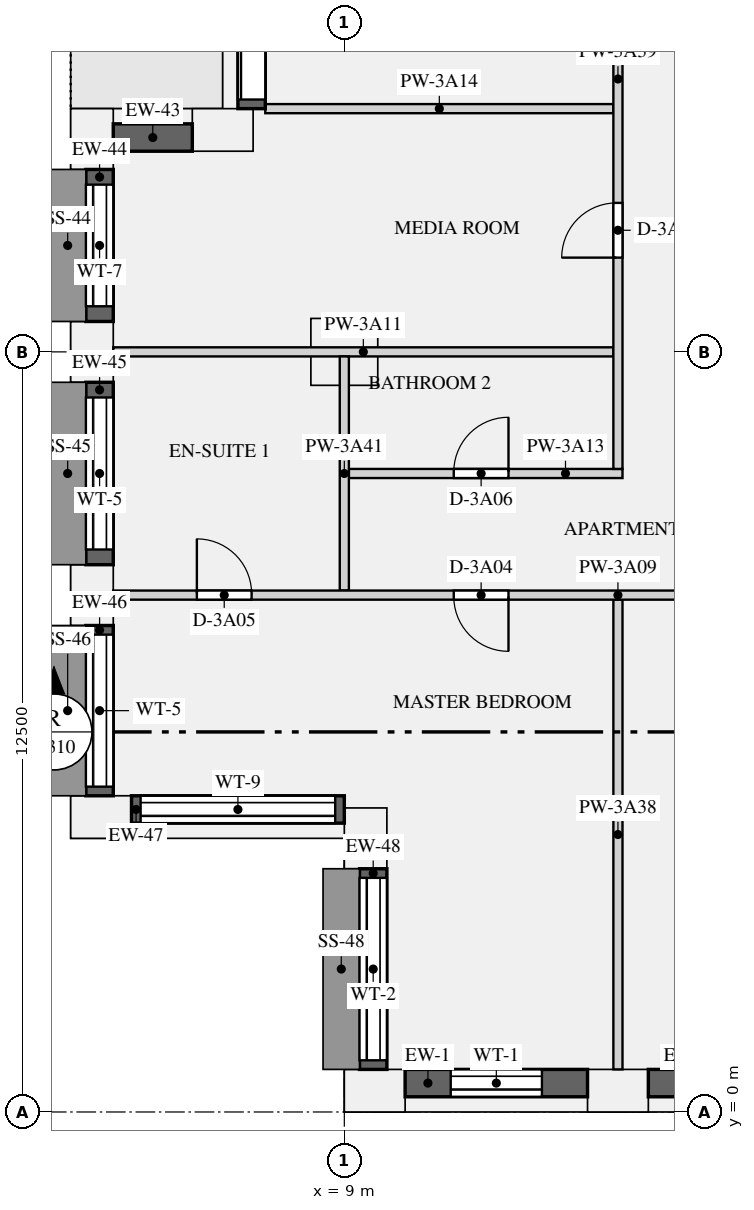
"""IFC4 building model, lengths in metres.
Left out: names, types, materials, properties, quantities, classifications, styles, units other than length and angle.
Written with IfcOpenShell. Run it as: python <this file> out.ifc"""

import sys

from ifc_helpers import new_model, si_unit, direction, frame, frame_2d, origin, origin_2d, place, context, subcontext, project, spatial, rectangle, extrude, element, fill, save


model = new_model("IFC4")
c1 = context("Model", 3, precision=1e-05, world=origin(), true_north=direction((0.0, 1.0)))
c2 = subcontext(c1, "Body", "Model", "MODEL_VIEW")
j1 = project(units=[si_unit("LENGTHUNIT", "METRE"), si_unit("PLANEANGLEUNIT", "RADIAN")], contexts=[c1])
p1 = place(None, origin())
s1 = spatial("IfcSite", under=j1, at=p1, CompositionType="ELEMENT")
p2 = place(p1, origin())
s2 = spatial("IfcBuilding", under=s1, at=p2, CompositionType="ELEMENT")
p3 = place(p2, frame((0.0, 0.0, 141.3)))
s3 = spatial("IfcBuildingStorey", under=s2, at=p3, CompositionType="ELEMENT", Elevation=141.3)
for number, where, z_axis, x_axis in (
    (1, (9.5, 0.35, 0.0), (0.0, 0.0, 1.0), (1.0, 0.0, 0.0)),
    (2, (13.5, 0.35, 0.0), (0.0, 0.0, 1.0), (1.0, 0.0, 0.0)),
    (3, (7.0, 16.15, 0.0), (0.0, 0.0, 1.0), (-1.0, 0.0, 0.0)),
    (4, (4.85, 16.0, 0.0), (0.0, 0.0, 1.0), (0.0, -1.0, 0.0)),
    (5, (4.85, 12.5, 0.0), (0.0, 0.0, 1.0), (0.0, -1.0, 0.0)),
    (6, (4.85, 8.5, 0.0), (0.0, 0.0, 1.0), (0.0, -1.0, 0.0)),
    (7, (5.0, 4.85, 0.0), (0.0, 0.0, 1.0), (1.0, 0.0, 0.0)),
    (8, (9.35, 4.5, 0.0), (0.0, 0.0, 1.0), (0.0, -1.0, 0.0)),
):
    element("IfcColumn", number, at=place(p3, frame(where, z_axis=z_axis, x_axis=x_axis)), inside=s3, PredefinedType="USERDEFINED", context=c2, shape_type="SweptSolid", body=[
        extrude(rectangle(XDim=1.0, YDim=0.7, at=origin_2d()), origin(), (0.0, 0.0, 1.0), 3.15),
    ])
p4 = place(p3, frame((9.0, 12.5, 0.0), z_axis=(0.0, 0.0, 1.0), x_axis=(1.0, 0.0, 0.0)))
e9 = element("IfcColumn", 9, at=p4, inside=s3, PredefinedType="COLUMN", context=c2, shape_type="SweptSolid", body=[
    extrude(rectangle(XDim=1.1, YDim=1.1, at=origin_2d()), origin(), (0.0, 0.0, 1.0), 3.15),
])
p5 = place(p3, frame((10.0, 0.475, 0.9), z_axis=(0.0, 0.0, 1.0), x_axis=(1.0, 0.0, 0.0)))
e10 = element("IfcWall", 10, at=p5, inside=s3, PredefinedType="SOLIDWALL", context=c2, shape_type="SweptSolid", body=[
    extrude(rectangle(XDim=3.0, YDim=0.45, at=frame_2d((1.5, 0.0))), origin(), (0.0, 0.0, 1.0), 1.93),
])
p6 = place(p5, frame((0.75, 0.0, 0.15)))
e11 = element("IfcOpeningElement", 11, at=p6, cuts=e10, PredefinedType="OPENING", context=c2, shape_type="SweptSolid", body=[
    extrude(rectangle(XDim=1.5, YDim=1.5, at=frame_2d((0.75, 0.75))), frame((0.0, 0.235, 0.0), z_axis=(0.0, -1.0, 0.0), x_axis=(1.0, 0.0, 0.0)), (0.0, 0.0, 1.0), 0.47),
])
p7 = place(p3, frame((14.0, 0.475, 0.9), z_axis=(0.0, 0.0, 1.0), x_axis=(1.0, 0.0, 0.0)))
e12 = element("IfcWall", 12, at=p7, inside=s3, PredefinedType="SOLIDWALL", context=c2, shape_type="SweptSolid", body=[
    extrude(rectangle(XDim=4.0, YDim=0.45, at=frame_2d((2.0, 0.0))), origin(), (0.0, 0.0, 1.0), 1.93),
])
p8 = place(p7, frame((1.25, 0.0, 0.15)))
e13 = element("IfcOpeningElement", 13, at=p8, cuts=e12, PredefinedType="OPENING", context=c2, shape_type="SweptSolid", body=[
    extrude(rectangle(XDim=1.5, YDim=1.5, at=frame_2d((0.75, 0.75))), frame((0.0, 0.235, 0.0), z_axis=(0.0, -1.0, 0.0), x_axis=(1.0, 0.0, 0.0)), (0.0, 0.0, 1.0), 0.47),
])
p9 = place(p3, frame((7.475, 20.0, 0.0), z_axis=(0.0, 0.0, 1.0), x_axis=(0.0, -1.0, 0.0)))
e14 = element("IfcWall", 14, at=p9, inside=s3, PredefinedType="SOLIDWALL", context=c2, shape_type="SweptSolid", body=[
    extrude(rectangle(XDim=3.5, YDim=0.45, at=frame_2d((1.75, 0.0))), origin(), (0.0, 0.0, 1.0), 2.83),
])
p10 = place(p9, frame((0.15, 0.0, 0.0)))
e15 = element("IfcOpeningElement", 15, at=p10, cuts=e14, PredefinedType="OPENING", context=c2, shape_type="SweptSolid", body=[
    extrude(rectangle(XDim=3.2, YDim=2.3, at=frame_2d((1.6, 1.15))), frame((0.0, 0.235, 0.0), z_axis=(0.0, -1.0, 0.0), x_axis=(1.0, 0.0, 0.0)), (0.0, 0.0, 1.0), 0.47),
])
p11 = place(p3, frame((6.5, 16.025, 0.9), z_axis=(0.0, 0.0, 1.0), x_axis=(-1.0, 0.0, 0.0)))
e16 = element("IfcWall", 16, at=p11, inside=s3, PredefinedType="SOLIDWALL", context=c2, shape_type="SweptSolid", body=[
    extrude(rectangle(XDim=1.3, YDim=0.45, at=frame_2d((0.65, 0.0))), origin(), (0.0, 0.0, 1.0), 1.93),
])
p12 = place(p3, frame((4.975, 15.5, 0.9), z_axis=(0.0, 0.0, 1.0), x_axis=(0.0, -1.0, 0.0)))
e17 = element("IfcWall", 17, at=p12, inside=s3, PredefinedType="SOLIDWALL", context=c2, shape_type="SweptSolid", body=[
    extrude(rectangle(XDim=2.5, YDim=0.45, at=frame_2d((1.25, 0.0))), origin(), (0.0, 0.0, 1.0), 1.93),
])
p13 = place(p12, frame((0.25, 0.0, 0.15)))
e18 = element("IfcOpeningElement", 18, at=p13, cuts=e17, PredefinedType="OPENING", context=c2, shape_type="SweptSolid", body=[
    extrude(rectangle(XDim=2.0, YDim=1.5, at=frame_2d((1.0, 0.75))), frame((0.0, 0.235, 0.0), z_axis=(0.0, -1.0, 0.0), x_axis=(1.0, 0.0, 0.0)), (0.0, 0.0, 1.0), 0.47),
])
p14 = place(p3, frame((4.975, 12.0, 0.9), z_axis=(0.0, 0.0, 1.0), x_axis=(0.0, -1.0, 0.0)))
e19 = element("IfcWall", 19, at=p14, inside=s3, PredefinedType="SOLIDWALL", context=c2, shape_type="SweptSolid", body=[
    extrude(rectangle(XDim=3.0, YDim=0.45, at=frame_2d((1.5, 0.0))), origin(), (0.0, 0.0, 1.0), 1.93),
])
p15 = place(p14, frame((0.25, 0.0, 0.15)))
e20 = element("IfcOpeningElement", 20, at=p15, cuts=e19, PredefinedType="OPENING", context=c2, shape_type="SweptSolid", body=[
    extrude(rectangle(XDim=2.5, YDim=1.5, at=frame_2d((1.25, 0.75))), frame((0.0, 0.235, 0.0), z_axis=(0.0, -1.0, 0.0), x_axis=(1.0, 0.0, 0.0)), (0.0, 0.0, 1.0), 0.47),
])
p16 = place(p3, frame((4.975, 8.0, 0.9), z_axis=(0.0, 0.0, 1.0), x_axis=(0.0, -1.0, 0.0)))
e21 = element("IfcWall", 21, at=p16, inside=s3, PredefinedType="SOLIDWALL", context=c2, shape_type="SweptSolid", body=[
    extrude(rectangle(XDim=2.8, YDim=0.45, at=frame_2d((1.4, 0.0))), origin(), (0.0, 0.0, 1.0), 1.93),
])
p17 = place(p16, frame((0.15, 0.0, 0.15)))
e22 = element("IfcOpeningElement", 22, at=p17, cuts=e21, PredefinedType="OPENING", context=c2, shape_type="SweptSolid", body=[
    extrude(rectangle(XDim=2.5, YDim=1.5, at=frame_2d((1.25, 0.75))), frame((0.0, 0.235, 0.0), z_axis=(0.0, -1.0, 0.0), x_axis=(1.0, 0.0, 0.0)), (0.0, 0.0, 1.0), 0.47),
])
p18 = place(p3, frame((5.5, 4.975, 0.9), z_axis=(0.0, 0.0, 1.0), x_axis=(1.0, 0.0, 0.0)))
e23 = element("IfcWall", 23, at=p18, inside=s3, PredefinedType="SOLIDWALL", context=c2, shape_type="SweptSolid", body=[
    extrude(rectangle(XDim=3.5, YDim=0.45, at=frame_2d((1.75, 0.0))), origin(), (0.0, 0.0, 1.0), 1.93),
])
p19 = place(p18, frame((0.15, 0.0, 0.15)))
e24 = element("IfcOpeningElement", 24, at=p19, cuts=e23, PredefinedType="OPENING", context=c2, shape_type="SweptSolid", body=[
    extrude(rectangle(XDim=3.2, YDim=1.5, at=frame_2d((1.6, 0.75))), frame((0.0, 0.235, 0.0), z_axis=(0.0, -1.0, 0.0), x_axis=(1.0, 0.0, 0.0)), (0.0, 0.0, 1.0), 0.47),
])
p20 = place(p3, frame((9.475, 4.0, 0.9), z_axis=(0.0, 0.0, 1.0), x_axis=(0.0, -1.0, 0.0)))
e25 = element("IfcWall", 25, at=p20, inside=s3, PredefinedType="SOLIDWALL", context=c2, shape_type="SweptSolid", body=[
    extrude(rectangle(XDim=3.3, YDim=0.45, at=frame_2d((1.65, 0.0))), origin(), (0.0, 0.0, 1.0), 1.93),
])
p21 = place(p20, frame((0.15, 0.0, 0.15)))
e26 = element("IfcOpeningElement", 26, at=p21, cuts=e25, PredefinedType="OPENING", context=c2, shape_type="SweptSolid", body=[
    extrude(rectangle(XDim=3.0, YDim=1.5, at=frame_2d((1.5, 0.75))), frame((0.0, 0.235, 0.0), z_axis=(0.0, -1.0, 0.0), x_axis=(1.0, 0.0, 0.0)), (0.0, 0.0, 1.0), 0.47),
])
p22 = place(p3, frame((5.2, 8.5, 0.0), z_axis=(0.0, 0.0, 1.0), x_axis=(1.0, 0.0, 0.0)))
e27 = element("IfcWall", 27, at=p22, inside=s3, PredefinedType="PARTITIONING", context=c2, shape_type="SweptSolid", body=[
    extrude(rectangle(XDim=12.8, YDim=0.15, at=frame_2d((6.4, 0.0))), origin(), (0.0, 0.0, 1.0), 2.83),
])
p23 = place(p22, frame((10.1, 0.0, 0.0)))
e28 = element("IfcOpeningElement", 28, at=p23, cuts=e27, PredefinedType="OPENING", context=c2, shape_type="SweptSolid", body=[
    extrude(rectangle(XDim=0.9, YDim=2.1, at=frame_2d((0.45, 1.05))), frame((0.0, 0.085, 0.0), z_axis=(0.0, -1.0, 0.0), x_axis=(1.0, 0.0, 0.0)), (0.0, 0.0, 1.0), 0.17),
])
p24 = place(p22, frame((5.6, 0.0, 0.0)))
e29 = element("IfcOpeningElement", 29, at=p24, cuts=e27, PredefinedType="OPENING", context=c2, shape_type="SweptSolid", body=[
    extrude(rectangle(XDim=0.9, YDim=2.1, at=frame_2d((0.45, 1.05))), frame((0.0, 0.085, 0.0), z_axis=(0.0, -1.0, 0.0), x_axis=(1.0, 0.0, 0.0)), (0.0, 0.0, 1.0), 0.17),
])
p25 = place(p22, frame((1.375, 0.0, 0.0)))
e30 = element("IfcOpeningElement", 30, at=p25, cuts=e27, PredefinedType="OPENING", context=c2, shape_type="SweptSolid", body=[
    extrude(rectangle(XDim=0.9, YDim=2.1, at=frame_2d((0.45, 1.05))), frame((0.0, 0.085, 0.0), z_axis=(0.0, -1.0, 0.0), x_axis=(1.0, 0.0, 0.0)), (0.0, 0.0, 1.0), 0.17),
])
p26 = place(p3, frame((5.2, 12.5, 0.0), z_axis=(0.0, 0.0, 1.0), x_axis=(1.0, 0.0, 0.0)))
e31 = element("IfcWall", 31, at=p26, inside=s3, PredefinedType="PARTITIONING", context=c2, shape_type="SweptSolid", body=[
    extrude(rectangle(XDim=8.225, YDim=0.15, at=frame_2d((4.113, 0.0))), origin(), (0.0, 0.0, 1.0), 2.83),
])
p27 = place(p3, frame((9.075, 10.5, 0.0), z_axis=(0.0, 0.0, 1.0), x_axis=(1.0, 0.0, 0.0)))
e32 = element("IfcWall", 32, at=p27, inside=s3, PredefinedType="PARTITIONING", context=c2, shape_type="SweptSolid", body=[
    extrude(rectangle(XDim=4.5, YDim=0.15, at=frame_2d((2.25, 0.0))), origin(), (0.0, 0.0, 1.0), 2.83),
])
p28 = place(p27, frame((1.725, 0.0, 0.0)))
e33 = element("IfcOpeningElement", 33, at=p28, cuts=e32, PredefinedType="OPENING", context=c2, shape_type="SweptSolid", body=[
    extrude(rectangle(XDim=0.9, YDim=2.1, at=frame_2d((0.45, 1.05))), frame((0.0, 0.085, 0.0), z_axis=(0.0, -1.0, 0.0), x_axis=(1.0, 0.0, 0.0)), (0.0, 0.0, 1.0), 0.17),
])
p29 = place(p3, frame((7.7, 16.5, 0.0), z_axis=(0.0, 0.0, 1.0), x_axis=(1.0, 0.0, 0.0)))
e34 = element("IfcWall", 34, at=p29, inside=s3, PredefinedType="PARTITIONING", context=c2, shape_type="SweptSolid", body=[
    extrude(rectangle(XDim=5.725, YDim=0.15, at=frame_2d((2.863, 0.0))), origin(), (0.0, 0.0, 1.0), 2.83),
])
p30 = place(p3, frame((13.5, 0.7, 0.0), z_axis=(0.0, 0.0, 1.0), x_axis=(0.0, 1.0, 0.0)))
e35 = element("IfcWall", 35, at=p30, inside=s3, PredefinedType="PARTITIONING", context=c2, shape_type="SweptSolid", body=[
    extrude(rectangle(XDim=7.725, YDim=0.15, at=frame_2d((3.863, 0.0))), origin(), (0.0, 0.0, 1.0), 2.83),
])
p31 = place(p3, frame((13.5, 10.575, 0.0), z_axis=(0.0, 0.0, 1.0), x_axis=(0.0, 1.0, 0.0)))
e36 = element("IfcWall", 36, at=p31, inside=s3, PredefinedType="PARTITIONING", context=c2, shape_type="SweptSolid", body=[
    extrude(rectangle(XDim=12.325, YDim=0.15, at=frame_2d((6.163, 0.0))), origin(), (0.0, 0.0, 1.0), 2.83),
])
p32 = place(p31, frame((3.475, 0.0, 0.0)))
e37 = element("IfcOpeningElement", 37, at=p32, cuts=e36, PredefinedType="OPENING", context=c2, shape_type="SweptSolid", body=[
    extrude(rectangle(XDim=0.9, YDim=2.1, at=frame_2d((0.45, 1.05))), frame((0.0, 0.085, 0.0), z_axis=(0.0, -1.0, 0.0), x_axis=(1.0, 0.0, 0.0)), (0.0, 0.0, 1.0), 0.17),
])
p33 = place(p31, frame((8.45, 0.0, 0.0)))
e38 = element("IfcOpeningElement", 38, at=p33, cuts=e36, PredefinedType="OPENING", context=c2, shape_type="SweptSolid", body=[
    extrude(rectangle(XDim=1.5, YDim=2.1, at=frame_2d((0.75, 1.05))), frame((0.0, 0.085, 0.0), z_axis=(0.0, -1.0, 0.0), x_axis=(1.0, 0.0, 0.0)), (0.0, 0.0, 1.0), 0.17),
])
p34 = place(p3, frame((9.0, 8.575, 0.0), z_axis=(0.0, 0.0, 1.0), x_axis=(0.0, 1.0, 0.0)))
e39 = element("IfcWall", 39, at=p34, inside=s3, PredefinedType="PARTITIONING", context=c2, shape_type="SweptSolid", body=[
    extrude(rectangle(XDim=3.85, YDim=0.15, at=frame_2d((1.925, 0.0))), origin(), (0.0, 0.0, 1.0), 2.83),
])
p35 = place(p6, origin())
e40 = element("IfcWindow", 40, at=p35, inside=s3, PartitioningType="SINGLE_PANEL", PredefinedType="WINDOW", context=c2, shape_type="SweptSolid", body=[
    extrude(rectangle(XDim=1.5, YDim=1.5, at=frame_2d((0.75, 0.75))), frame((0.0, -0.065, 0.0), z_axis=(0.0, -1.0, 0.0), x_axis=(1.0, 0.0, 0.0)), (0.0, 0.0, 1.0), 0.06),
])
fill(e11, e40)
p36 = place(p10, origin())
e41 = element("IfcDoor", 41, at=p36, inside=s3, OperationType="SLIDING_TO_LEFT", PredefinedType="DOOR", context=c2, shape_type="SweptSolid", body=[
    extrude(rectangle(XDim=3.2, YDim=2.3, at=frame_2d((1.6, 1.15))), frame((0.0, -0.07, 0.0), z_axis=(0.0, -1.0, 0.0), x_axis=(1.0, 0.0, 0.0)), (0.0, 0.0, 1.0), 0.05),
])
fill(e15, e41)
p37 = place(p13, origin())
e42 = element("IfcWindow", 42, at=p37, inside=s3, PartitioningType="SINGLE_PANEL", PredefinedType="WINDOW", context=c2, shape_type="SweptSolid", body=[
    extrude(rectangle(XDim=2.0, YDim=1.5, at=frame_2d((1.0, 0.75))), frame((0.0, -0.065, 0.0), z_axis=(0.0, -1.0, 0.0), x_axis=(1.0, 0.0, 0.0)), (0.0, 0.0, 1.0), 0.06),
])
fill(e18, e42)
p38 = place(p15, origin())
e43 = element("IfcWindow", 43, at=p38, inside=s3, PartitioningType="SINGLE_PANEL", PredefinedType="WINDOW", context=c2, shape_type="SweptSolid", body=[
    extrude(rectangle(XDim=2.5, YDim=1.5, at=frame_2d((1.25, 0.75))), frame((0.0, -0.065, 0.0), z_axis=(0.0, -1.0, 0.0), x_axis=(1.0, 0.0, 0.0)), (0.0, 0.0, 1.0), 0.06),
])
fill(e20, e43)
p39 = place(p17, origin())
e44 = element("IfcWindow", 44, at=p39, inside=s3, PartitioningType="SINGLE_PANEL", PredefinedType="WINDOW", context=c2, shape_type="SweptSolid", body=[
    extrude(rectangle(XDim=2.5, YDim=1.5, at=frame_2d((1.25, 0.75))), frame((0.0, -0.065, 0.0), z_axis=(0.0, -1.0, 0.0), x_axis=(1.0, 0.0, 0.0)), (0.0, 0.0, 1.0), 0.06),
])
fill(e22, e44)
p40 = place(p19, origin())
e45 = element("IfcWindow", 45, at=p40, inside=s3, PartitioningType="SINGLE_PANEL", PredefinedType="WINDOW", context=c2, shape_type="SweptSolid", body=[
    extrude(rectangle(XDim=3.2, YDim=1.5, at=frame_2d((1.6, 0.75))), frame((0.0, -0.065, 0.0), z_axis=(0.0, -1.0, 0.0), x_axis=(1.0, 0.0, 0.0)), (0.0, 0.0, 1.0), 0.06),
])
fill(e24, e45)
p41 = place(p21, origin())
e46 = element("IfcWindow", 46, at=p41, inside=s3, PartitioningType="SINGLE_PANEL", PredefinedType="WINDOW", context=c2, shape_type="SweptSolid", body=[
    extrude(rectangle(XDim=3.0, YDim=1.5, at=frame_2d((1.5, 0.75))), frame((0.0, -0.065, 0.0), z_axis=(0.0, -1.0, 0.0), x_axis=(1.0, 0.0, 0.0)), (0.0, 0.0, 1.0), 0.06),
])
fill(e26, e46)
p42 = place(p24, frame((0.9, 0.0, 0.0), z_axis=(0.0, 0.0, 1.0), x_axis=(-1.0, 0.0, 0.0)))
e47 = element("IfcDoor", 47, at=p42, inside=s3, OperationType="SINGLE_SWING_LEFT", PredefinedType="DOOR", context=c2, shape_type="SweptSolid", body=[
    extrude(rectangle(XDim=0.9, YDim=2.1, at=frame_2d((0.45, 1.05))), frame((0.0, 0.025, 0.0), z_axis=(0.0, -1.0, 0.0), x_axis=(1.0, 0.0, 0.0)), (0.0, 0.0, 1.0), 0.05),
])
fill(e29, e47)
p43 = place(p25, origin())
e48 = element("IfcDoor", 48, at=p43, inside=s3, OperationType="SINGLE_SWING_LEFT", PredefinedType="DOOR", context=c2, shape_type="SweptSolid", body=[
    extrude(rectangle(XDim=0.9, YDim=2.1, at=frame_2d((0.45, 1.05))), frame((0.0, 0.025, 0.0), z_axis=(0.0, -1.0, 0.0), x_axis=(1.0, 0.0, 0.0)), (0.0, 0.0, 1.0), 0.05),
])
fill(e30, e48)
p44 = place(p28, origin())
e49 = element("IfcDoor", 49, at=p44, inside=s3, OperationType="SINGLE_SWING_RIGHT", PredefinedType="DOOR", context=c2, shape_type="SweptSolid", body=[
    extrude(rectangle(XDim=0.9, YDim=2.1, at=frame_2d((0.45, 1.05))), frame((0.0, 0.025, 0.0), z_axis=(0.0, -1.0, 0.0), x_axis=(1.0, 0.0, 0.0)), (0.0, 0.0, 1.0), 0.05),
])
fill(e33, e49)
p45 = place(p32, origin())
e50 = element("IfcDoor", 50, at=p45, inside=s3, OperationType="SINGLE_SWING_LEFT", PredefinedType="DOOR", context=c2, shape_type="SweptSolid", body=[
    extrude(rectangle(XDim=0.9, YDim=2.1, at=frame_2d((0.45, 1.05))), frame((0.0, 0.025, 0.0), z_axis=(0.0, -1.0, 0.0), x_axis=(1.0, 0.0, 0.0)), (0.0, 0.0, 1.0), 0.05),
])
fill(e37, e50)
save(model, sys.argv[1])
